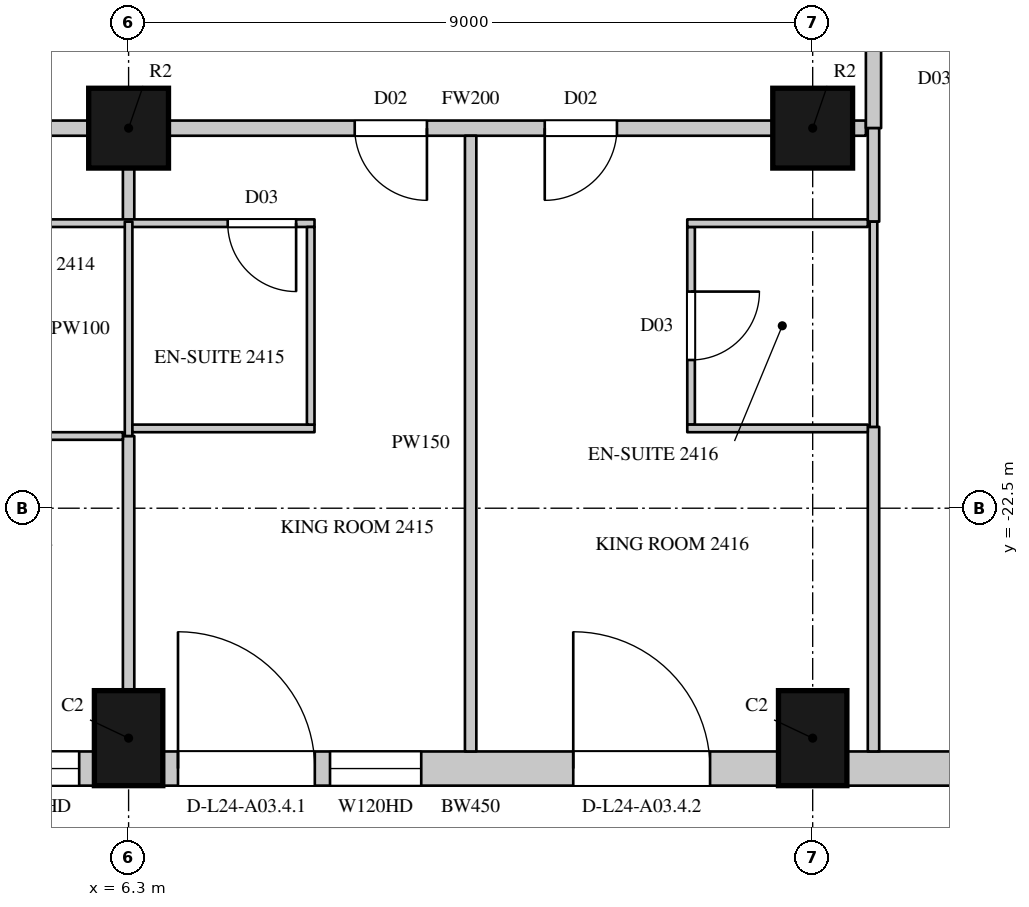
"""IFC4 building model, lengths in metres.
Left out: names, types, materials, properties, quantities, classifications, styles, units other than length and angle.
Written with IfcOpenShell. Run it as: python <this file> out.ifc"""

import sys

from ifc_helpers import new_model, si_unit, direction, frame, frame_2d, origin, origin_2d, place, context, subcontext, project, spatial, rectangle, circle, extrude, element, fill, save


model = new_model("IFC4")
c1 = context("Model", 3, precision=1e-05, world=origin(), true_north=direction((0.0, 1.0)))
c2 = subcontext(c1, "Body", "Model", "MODEL_VIEW")
j1 = project(units=[si_unit("LENGTHUNIT", "METRE"), si_unit("PLANEANGLEUNIT", "RADIAN")], contexts=[c1])
p1 = place(None, origin())
s1 = spatial("IfcSite", under=j1, at=p1, CompositionType="ELEMENT")
p2 = place(p1, origin())
s2 = spatial("IfcBuilding", under=s1, at=p2, CompositionType="ELEMENT")
p3 = place(p2, frame((0.0, 0.0, 116.7)))
s3 = spatial("IfcBuildingStorey", under=s2, at=p3, CompositionType="ELEMENT", Elevation=116.7)
for number, where, z_axis, x_axis in (
    (1, (6.3, -25.525, 0.0), (0.0, 0.0, 1.0), (1.0, 0.0, 0.0)),
    (2, (15.3, -25.525, 0.0), (0.0, 0.0, 1.0), (1.0, 0.0, 0.0)),
):
    element("IfcColumn", number, at=place(p3, frame(where, z_axis=z_axis, x_axis=x_axis)), inside=s3, PredefinedType="COLUMN", context=c2, shape_type="SweptSolid", body=[
        extrude(rectangle(XDim=0.9, YDim=1.25, at=origin_2d()), origin(), (0.0, 0.0, 1.0), 3.6),
    ])
for number, where, z_axis, x_axis in (
    (3, (6.3, -17.5, 0.0), (0.0, 0.0, 1.0), (1.0, 0.0, 0.0)),
    (4, (15.3, -17.5, 0.0), (0.0, 0.0, 1.0), (1.0, 0.0, 0.0)),
):
    element("IfcColumn", number, at=place(p3, frame(where, z_axis=z_axis, x_axis=x_axis)), inside=s3, PredefinedType="COLUMN", context=c2, shape_type="SweptSolid", body=[
        extrude(circle(Radius=0.525, at=origin_2d()), origin(), (0.0, 0.0, 1.0), 3.6),
    ])
p4 = place(p3, frame((-2.25, -25.925, 0.0), z_axis=(0.0, 0.0, 1.0), x_axis=(1.0, 0.0, 0.0)))
e5 = element("IfcWall", 5, at=p4, inside=s3, PredefinedType="SOLIDWALL", context=c2, shape_type="SweptSolid", body=[
    extrude(rectangle(XDim=8.1, YDim=0.45, at=frame_2d((4.05, 0.0))), origin(), (0.0, 0.0, 1.0), 3.3),
])
p5 = place(p4, frame((0.2, 0.0, 0.0)))
e6 = element("IfcOpeningElement", 6, at=p5, cuts=e5, PredefinedType="OPENING", context=c2, shape_type="SweptSolid", body=[
    extrude(rectangle(XDim=1.8, YDim=2.4, at=frame_2d((0.9, 1.2))), frame((0.0, 0.235, 0.0), z_axis=(0.0, -1.0, 0.0), x_axis=(1.0, 0.0, 0.0)), (0.0, 0.0, 1.0), 0.47),
])
p6 = place(p4, frame((2.2, 0.0, 1.05)))
e7 = element("IfcOpeningElement", 7, at=p6, cuts=e5, PredefinedType="OPENING", context=c2, shape_type="SweptSolid", body=[
    extrude(rectangle(XDim=1.2, YDim=2.0, at=frame_2d((0.6, 1.0))), frame((0.0, 0.235, 0.0), z_axis=(0.0, -1.0, 0.0), x_axis=(1.0, 0.0, 0.0)), (0.0, 0.0, 1.0), 0.47),
])
p7 = place(p4, frame((4.7, 0.0, 0.0)))
e8 = element("IfcOpeningElement", 8, at=p7, cuts=e5, PredefinedType="OPENING", context=c2, shape_type="SweptSolid", body=[
    extrude(rectangle(XDim=1.8, YDim=2.4, at=frame_2d((0.9, 1.2))), frame((0.0, 0.235, 0.0), z_axis=(0.0, -1.0, 0.0), x_axis=(1.0, 0.0, 0.0)), (0.0, 0.0, 1.0), 0.47),
])
p8 = place(p4, frame((6.7, 0.0, 1.05)))
e9 = element("IfcOpeningElement", 9, at=p8, cuts=e5, PredefinedType="OPENING", context=c2, shape_type="SweptSolid", body=[
    extrude(rectangle(XDim=1.2, YDim=2.0, at=frame_2d((0.6, 1.0))), frame((0.0, 0.235, 0.0), z_axis=(0.0, -1.0, 0.0), x_axis=(1.0, 0.0, 0.0)), (0.0, 0.0, 1.0), 0.47),
])
p9 = place(p3, frame((6.75, -25.925, 0.0), z_axis=(0.0, 0.0, 1.0), x_axis=(1.0, 0.0, 0.0)))
e10 = element("IfcWall", 10, at=p9, inside=s3, PredefinedType="SOLIDWALL", context=c2, shape_type="SweptSolid", body=[
    extrude(rectangle(XDim=8.1, YDim=0.45, at=frame_2d((4.05, 0.0))), origin(), (0.0, 0.0, 1.0), 3.3),
])
p10 = place(p9, frame((0.2, 0.0, 0.0)))
e11 = element("IfcOpeningElement", 11, at=p10, cuts=e10, PredefinedType="OPENING", context=c2, shape_type="SweptSolid", body=[
    extrude(rectangle(XDim=1.8, YDim=2.4, at=frame_2d((0.9, 1.2))), frame((0.0, 0.235, 0.0), z_axis=(0.0, -1.0, 0.0), x_axis=(1.0, 0.0, 0.0)), (0.0, 0.0, 1.0), 0.47),
])
p11 = place(p9, frame((2.2, 0.0, 1.05)))
e12 = element("IfcOpeningElement", 12, at=p11, cuts=e10, PredefinedType="OPENING", context=c2, shape_type="SweptSolid", body=[
    extrude(rectangle(XDim=1.2, YDim=2.0, at=frame_2d((0.6, 1.0))), frame((0.0, 0.235, 0.0), z_axis=(0.0, -1.0, 0.0), x_axis=(1.0, 0.0, 0.0)), (0.0, 0.0, 1.0), 0.47),
])
p12 = place(p9, frame((5.4, 0.0, 0.0)))
e13 = element("IfcOpeningElement", 13, at=p12, cuts=e10, PredefinedType="OPENING", context=c2, shape_type="SweptSolid", body=[
    extrude(rectangle(XDim=1.8, YDim=2.4, at=frame_2d((0.9, 1.2))), frame((0.0, 0.235, 0.0), z_axis=(0.0, -1.0, 0.0), x_axis=(1.0, 0.0, 0.0)), (0.0, 0.0, 1.0), 0.47),
])
p13 = place(p3, frame((15.75, -25.925, 0.0), z_axis=(0.0, 0.0, 1.0), x_axis=(1.0, 0.0, 0.0)))
e14 = element("IfcWall", 14, at=p13, inside=s3, PredefinedType="SOLIDWALL", context=c2, shape_type="SweptSolid", body=[
    extrude(rectangle(XDim=2.914, YDim=0.45, at=frame_2d((1.457, 0.0))), origin(), (0.0, 0.0, 1.0), 3.3),
])
p14 = place(p3, frame((-2.175, -17.5, 0.0), z_axis=(0.0, 0.0, 1.0), x_axis=(1.0, 0.0, 0.0)))
e15 = element("IfcWall", 15, at=p14, inside=s3, PredefinedType="PARTITIONING", context=c2, shape_type="SweptSolid", body=[
    extrude(rectangle(XDim=7.95, YDim=0.2, at=frame_2d((3.975, 0.0))), origin(), (0.0, 0.0, 1.0), 2.75),
])
p15 = place(p14, frame((1.65, 0.0, 0.0)))
e16 = element("IfcOpeningElement", 16, at=p15, cuts=e15, PredefinedType="OPENING", context=c2, shape_type="SweptSolid", body=[
    extrude(rectangle(XDim=1.1, YDim=2.4, at=frame_2d((0.55, 1.2))), frame((0.0, 0.11, 0.0), z_axis=(0.0, -1.0, 0.0), x_axis=(1.0, 0.0, 0.0)), (0.0, 0.0, 1.0), 0.22),
])
p16 = place(p3, frame((6.825, -17.5, 0.0), z_axis=(0.0, 0.0, 1.0), x_axis=(1.0, 0.0, 0.0)))
e17 = element("IfcWall", 17, at=p16, inside=s3, PredefinedType="PARTITIONING", context=c2, shape_type="SweptSolid", body=[
    extrude(rectangle(XDim=7.95, YDim=0.2, at=frame_2d((3.975, 0.0))), origin(), (0.0, 0.0, 1.0), 2.75),
])
p17 = place(p16, frame((2.45, 0.0, 0.0)))
e18 = element("IfcOpeningElement", 18, at=p17, cuts=e17, PredefinedType="OPENING", context=c2, shape_type="SweptSolid", body=[
    extrude(rectangle(XDim=0.95, YDim=2.2, at=frame_2d((0.475, 1.1))), frame((0.0, 0.11, 0.0), z_axis=(0.0, -1.0, 0.0), x_axis=(1.0, 0.0, 0.0)), (0.0, 0.0, 1.0), 0.22),
])
p18 = place(p16, frame((4.95, 0.0, 0.0)))
e19 = element("IfcOpeningElement", 19, at=p18, cuts=e17, PredefinedType="OPENING", context=c2, shape_type="SweptSolid", body=[
    extrude(rectangle(XDim=0.95, YDim=2.2, at=frame_2d((0.475, 1.1))), frame((0.0, 0.11, 0.0), z_axis=(0.0, -1.0, 0.0), x_axis=(1.0, 0.0, 0.0)), (0.0, 0.0, 1.0), 0.22),
])
p19 = place(p3, frame((15.825, -17.5, 0.0), z_axis=(0.0, 0.0, 1.0), x_axis=(1.0, 0.0, 0.0)))
e20 = element("IfcWall", 20, at=p19, inside=s3, PredefinedType="PARTITIONING", context=c2, shape_type="SweptSolid", body=[
    extrude(rectangle(XDim=0.175, YDim=0.2, at=frame_2d((0.087, 0.0))), origin(), (0.0, 0.0, 1.0), 3.3),
])
p20 = place(p3, frame((16.1, -17.5, 0.0), z_axis=(0.0, 0.0, 1.0), x_axis=(0.0, 1.0, 0.0)))
e21 = element("IfcWall", 21, at=p20, inside=s3, PredefinedType="PARTITIONING", context=c2, shape_type="SweptSolid", body=[
    extrude(rectangle(XDim=12.75, YDim=0.2, at=frame_2d((6.375, 0.0))), origin(), (0.0, 0.0, 1.0), 3.3),
])
p21 = place(p20, frame((2.75, 0.0, 0.0)))
e22 = element("IfcOpeningElement", 22, at=p21, cuts=e21, PredefinedType="OPENING", context=c2, shape_type="SweptSolid", body=[
    extrude(rectangle(XDim=0.95, YDim=2.2, at=frame_2d((0.475, 1.1))), frame((0.0, 0.11, 0.0), z_axis=(0.0, -1.0, 0.0), x_axis=(1.0, 0.0, 0.0)), (0.0, 0.0, 1.0), 0.22),
])
p22 = place(p20, frame((6.95, 0.0, 0.0)))
e23 = element("IfcOpeningElement", 23, at=p22, cuts=e21, PredefinedType="OPENING", context=c2, shape_type="SweptSolid", body=[
    extrude(rectangle(XDim=0.95, YDim=2.2, at=frame_2d((0.475, 1.1))), frame((0.0, 0.11, 0.0), z_axis=(0.0, -1.0, 0.0), x_axis=(1.0, 0.0, 0.0)), (0.0, 0.0, 1.0), 0.22),
])
p23 = place(p20, frame((11.4, 0.0, 0.0)))
e24 = element("IfcOpeningElement", 24, at=p23, cuts=e21, PredefinedType="OPENING", context=c2, shape_type="SweptSolid", body=[
    extrude(rectangle(XDim=0.95, YDim=2.2, at=frame_2d((0.475, 1.1))), frame((0.0, 0.11, 0.0), z_axis=(0.0, -1.0, 0.0), x_axis=(1.0, 0.0, 0.0)), (0.0, 0.0, 1.0), 0.22),
])
p24 = place(p3, frame((6.3, -24.9, 0.0), z_axis=(0.0, 0.0, 1.0), x_axis=(0.0, 1.0, 0.0)))
e25 = element("IfcWall", 25, at=p24, inside=s3, PredefinedType="PARTITIONING", context=c2, shape_type="SweptSolid", body=[
    extrude(rectangle(XDim=3.35, YDim=0.15, at=frame_2d((1.675, 0.0))), origin(), (0.0, 0.0, 1.0), 2.75),
])
p25 = place(p3, frame((6.3, -18.73, 0.0), z_axis=(0.0, 0.0, 1.0), x_axis=(0.0, 1.0, 0.0)))
e26 = element("IfcWall", 26, at=p25, inside=s3, PredefinedType="PARTITIONING", context=c2, shape_type="SweptSolid", body=[
    extrude(rectangle(XDim=0.705, YDim=0.15, at=frame_2d((0.353, 0.0))), origin(), (0.0, 0.0, 1.0), 2.75),
])
p26 = place(p3, frame((10.8, -25.7, 0.0), z_axis=(0.0, 0.0, 1.0), x_axis=(0.0, 1.0, 0.0)))
e27 = element("IfcWall", 27, at=p26, inside=s3, PredefinedType="PARTITIONING", context=c2, shape_type="SweptSolid", body=[
    extrude(rectangle(XDim=8.1, YDim=0.15, at=frame_2d((4.05, 0.0))), origin(), (0.0, 0.0, 1.0), 2.65),
])
p27 = place(p3, frame((16.1, -25.7, 0.0), z_axis=(0.0, 0.0, 1.0), x_axis=(0.0, 1.0, 0.0)))
e28 = element("IfcWall", 28, at=p27, inside=s3, PredefinedType="PARTITIONING", context=c2, shape_type="SweptSolid", body=[
    extrude(rectangle(XDim=4.27, YDim=0.15, at=frame_2d((2.135, 0.0))), origin(), (0.0, 0.0, 1.0), 3.3),
])
p28 = place(p3, frame((16.1, -18.73, 0.0), z_axis=(0.0, 0.0, 1.0), x_axis=(0.0, 1.0, 0.0)))
e29 = element("IfcWall", 29, at=p28, inside=s3, PredefinedType="PARTITIONING", context=c2, shape_type="SweptSolid", body=[
    extrude(rectangle(XDim=1.23, YDim=0.15, at=frame_2d((0.615, 0.0))), origin(), (0.0, 0.0, 1.0), 3.3),
])
p29 = place(p3, frame((3.654, -21.55, 0.0), z_axis=(0.0, 0.0, 1.0), x_axis=(1.0, 0.0, 0.0)))
e30 = element("IfcWall", 30, at=p29, inside=s3, PredefinedType="PARTITIONING", context=c2, shape_type="SweptSolid", body=[
    extrude(rectangle(XDim=2.571, YDim=0.1, at=frame_2d((1.286, 0.0))), origin(), (0.0, 0.0, 1.0), 3.3),
])
p30 = place(p3, frame((3.654, -18.75, 0.0), z_axis=(0.0, 0.0, 1.0), x_axis=(1.0, 0.0, 0.0)))
e31 = element("IfcWall", 31, at=p30, inside=s3, PredefinedType="PARTITIONING", context=c2, shape_type="SweptSolid", body=[
    extrude(rectangle(XDim=5.092, YDim=0.1, at=frame_2d((2.546, 0.0))), origin(), (0.0, 0.0, 1.0), 3.3),
])
p31 = place(p30, frame((3.95, 0.0, 0.0)))
e32 = element("IfcOpeningElement", 32, at=p31, cuts=e31, PredefinedType="OPENING", context=c2, shape_type="SweptSolid", body=[
    extrude(rectangle(XDim=0.9, YDim=2.2, at=frame_2d((0.45, 1.1))), frame((0.0, 0.06, 0.0), z_axis=(0.0, -1.0, 0.0), x_axis=(1.0, 0.0, 0.0)), (0.0, 0.0, 1.0), 0.12),
])
p32 = place(p3, frame((6.3, -21.55, 0.0), z_axis=(0.0, 0.0, 1.0), x_axis=(0.0, 1.0, 0.0)))
e33 = element("IfcWall", 33, at=p32, inside=s3, PredefinedType="PARTITIONING", context=c2, shape_type="SweptSolid", body=[
    extrude(rectangle(XDim=2.82, YDim=0.1, at=frame_2d((1.41, 0.0))), origin(), (0.0, 0.0, 1.0), 2.75),
])
p33 = place(p3, frame((6.35, -21.45, 0.0), z_axis=(0.0, 0.0, 1.0), x_axis=(1.0, 0.0, 0.0)))
e34 = element("IfcWall", 34, at=p33, inside=s3, PredefinedType="PARTITIONING", context=c2, shape_type="SweptSolid", body=[
    extrude(rectangle(XDim=2.396, YDim=0.1, at=frame_2d((1.198, 0.0))), origin(), (0.0, 0.0, 1.0), 3.3),
])
p34 = place(p3, frame((8.696, -21.4, 0.0), z_axis=(0.0, 0.0, 1.0), x_axis=(0.0, 1.0, 0.0)))
e35 = element("IfcWall", 35, at=p34, inside=s3, PredefinedType="PARTITIONING", context=c2, shape_type="SweptSolid", body=[
    extrude(rectangle(XDim=2.6, YDim=0.1, at=frame_2d((1.3, 0.0))), origin(), (0.0, 0.0, 1.0), 3.3),
])
p35 = place(p3, frame((13.7, -21.4, 0.0), z_axis=(0.0, 0.0, 1.0), x_axis=(0.0, 1.0, 0.0)))
e36 = element("IfcWall", 36, at=p35, inside=s3, PredefinedType="PARTITIONING", context=c2, shape_type="SweptSolid", body=[
    extrude(rectangle(XDim=2.6, YDim=0.1, at=frame_2d((1.3, 0.0))), origin(), (0.0, 0.0, 1.0), 3.3),
])
p36 = place(p35, frame((0.85, 0.0, 0.0)))
e37 = element("IfcOpeningElement", 37, at=p36, cuts=e36, PredefinedType="OPENING", context=c2, shape_type="SweptSolid", body=[
    extrude(rectangle(XDim=0.9, YDim=2.2, at=frame_2d((0.45, 1.1))), frame((0.0, 0.06, 0.0), z_axis=(0.0, -1.0, 0.0), x_axis=(1.0, 0.0, 0.0)), (0.0, 0.0, 1.0), 0.12),
])
for number, where, z_axis, x_axis in (
    (38, (13.65, -21.45, 0.0), (0.0, 0.0, 1.0), (1.0, 0.0, 0.0)),
    (39, (13.65, -18.75, 0.0), (0.0, 0.0, 1.0), (1.0, 0.0, 0.0)),
):
    element("IfcWall", number, at=place(p3, frame(where, z_axis=z_axis, x_axis=x_axis)), inside=s3, PredefinedType="PARTITIONING", context=c2, shape_type="SweptSolid", body=[
        extrude(rectangle(XDim=2.375, YDim=0.1, at=frame_2d((1.188, 0.0))), origin(), (0.0, 0.0, 1.0), 3.3),
    ])
p37 = place(p3, frame((16.1, -21.43, 0.0), z_axis=(0.0, 0.0, 1.0), x_axis=(0.0, 1.0, 0.0)))
e40 = element("IfcWall", 40, at=p37, inside=s3, PredefinedType="PARTITIONING", context=c2, shape_type="SweptSolid", body=[
    extrude(rectangle(XDim=2.7, YDim=0.1, at=frame_2d((1.35, 0.0))), origin(), (0.0, 0.0, 1.0), 3.3),
])
p38 = place(p8, origin())
e41 = element("IfcWindow", 41, at=p38, inside=s3, PartitioningType="SINGLE_PANEL", PredefinedType="WINDOW", context=c2, shape_type="SweptSolid", body=[
    extrude(rectangle(XDim=1.2, YDim=2.0, at=frame_2d((0.6, 1.0))), frame((0.0, 0.135, 0.0), z_axis=(0.0, -1.0, 0.0), x_axis=(1.0, 0.0, 0.0)), (0.0, 0.0, 1.0), 0.06),
])
fill(e9, e41)
p39 = place(p10, origin())
e42 = element("IfcDoor", 42, at=p39, inside=s3, OperationType="SLIDING_TO_LEFT", PredefinedType="DOOR", context=c2, shape_type="SweptSolid", body=[
    extrude(rectangle(XDim=1.8, YDim=2.4, at=frame_2d((0.9, 1.2))), frame((0.0, 0.13, 0.0), z_axis=(0.0, -1.0, 0.0), x_axis=(1.0, 0.0, 0.0)), (0.0, 0.0, 1.0), 0.05),
])
fill(e11, e42)
p40 = place(p11, origin())
e43 = element("IfcWindow", 43, at=p40, inside=s3, PartitioningType="SINGLE_PANEL", PredefinedType="WINDOW", context=c2, shape_type="SweptSolid", body=[
    extrude(rectangle(XDim=1.2, YDim=2.0, at=frame_2d((0.6, 1.0))), frame((0.0, 0.135, 0.0), z_axis=(0.0, -1.0, 0.0), x_axis=(1.0, 0.0, 0.0)), (0.0, 0.0, 1.0), 0.06),
])
fill(e12, e43)
p41 = place(p12, origin())
e44 = element("IfcDoor", 44, at=p41, inside=s3, OperationType="SLIDING_TO_LEFT", PredefinedType="DOOR", context=c2, shape_type="SweptSolid", body=[
    extrude(rectangle(XDim=1.8, YDim=2.4, at=frame_2d((0.9, 1.2))), frame((0.0, 0.13, 0.0), z_axis=(0.0, -1.0, 0.0), x_axis=(1.0, 0.0, 0.0)), (0.0, 0.0, 1.0), 0.05),
])
fill(e13, e44)
p42 = place(p17, origin())
e45 = element("IfcDoor", 45, at=p42, inside=s3, OperationType="SINGLE_SWING_LEFT", PredefinedType="DOOR", context=c2, shape_type="SweptSolid", body=[
    extrude(rectangle(XDim=0.95, YDim=2.2, at=frame_2d((0.475, 1.1))), frame((0.0, 0.025, 0.0), z_axis=(0.0, -1.0, 0.0), x_axis=(1.0, 0.0, 0.0)), (0.0, 0.0, 1.0), 0.05),
])
fill(e18, e45)
p43 = place(p31, origin())
e46 = element("IfcDoor", 46, at=p43, inside=s3, OperationType="SINGLE_SWING_LEFT", PredefinedType="DOOR", context=c2, shape_type="SweptSolid", body=[
    extrude(rectangle(XDim=0.9, YDim=2.2, at=frame_2d((0.45, 1.1))), frame((0.0, 0.025, 0.0), z_axis=(0.0, -1.0, 0.0), x_axis=(1.0, 0.0, 0.0)), (0.0, 0.0, 1.0), 0.05),
])
fill(e32, e46)
p44 = place(p18, origin())
e47 = element("IfcDoor", 47, at=p44, inside=s3, OperationType="SINGLE_SWING_RIGHT", PredefinedType="DOOR", context=c2, shape_type="SweptSolid", body=[
    extrude(rectangle(XDim=0.95, YDim=2.2, at=frame_2d((0.475, 1.1))), frame((0.0, 0.025, 0.0), z_axis=(0.0, -1.0, 0.0), x_axis=(1.0, 0.0, 0.0)), (0.0, 0.0, 1.0), 0.05),
])
fill(e19, e47)
p45 = place(p36, origin())
e48 = element("IfcDoor", 48, at=p45, inside=s3, OperationType="SINGLE_SWING_LEFT", PredefinedType="DOOR", context=c2, shape_type="SweptSolid", body=[
    extrude(rectangle(XDim=0.9, YDim=2.2, at=frame_2d((0.45, 1.1))), frame((0.0, 0.025, 0.0), z_axis=(0.0, -1.0, 0.0), x_axis=(1.0, 0.0, 0.0)), (0.0, 0.0, 1.0), 0.05),
])
fill(e37, e48)
save(model, sys.argv[1])
